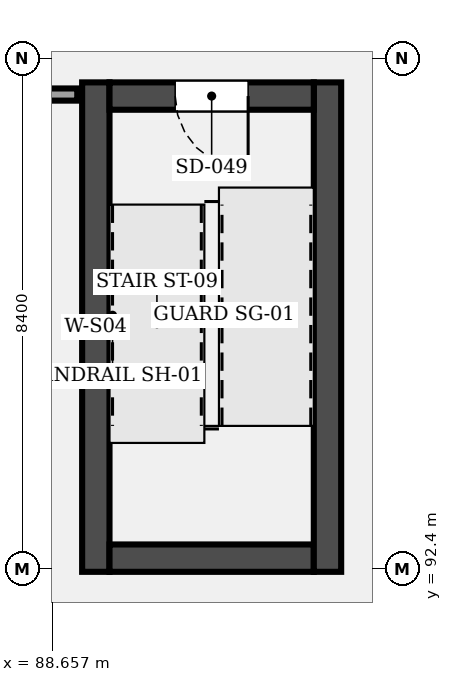
"""IFC4 building model, lengths in metres.
Left out: names, types, materials, properties, quantities, classifications, styles, units other than length and angle.
Written with IfcOpenShell. Run it as: python <this file> out.ifc"""

import sys

from ifc_helpers import new_model, si_unit, direction, frame, frame_2d, origin, place, context, subcontext, project, spatial, rectangle, extrude, element, fill, save


model = new_model("IFC4")
c1 = context("Model", 3, precision=1e-05, world=origin(), true_north=direction((0.0, 1.0)))
c2 = subcontext(c1, "Body", "Model", "MODEL_VIEW")
j1 = project(units=[si_unit("LENGTHUNIT", "METRE"), si_unit("PLANEANGLEUNIT", "RADIAN")], contexts=[c1])
p1 = place(None, origin())
s1 = spatial("IfcSite", under=j1, at=p1, CompositionType="ELEMENT")
p2 = place(p1, origin())
s2 = spatial("IfcBuilding", under=s1, at=p2, CompositionType="ELEMENT")
p3 = place(p2, origin())
s3 = spatial("IfcBuildingStorey", under=s2, at=p3, CompositionType="ELEMENT", Elevation=0.0)
p4 = place(p3, frame((89.375, 100.4, 0.0), z_axis=(0.0, 0.0, 1.0), x_axis=(0.0, -1.0, 0.0)))
e1 = element("IfcWall", 1, at=p4, inside=s3, PredefinedType="SHEAR", context=c2, shape_type="SweptSolid", body=[
    extrude(rectangle(XDim=8.05, YDim=0.45, at=frame_2d((4.025, 0.0))), origin(), (0.0, 0.0, 1.0), 5.1),
])
p5 = place(p3, frame((89.6, 92.575, 0.0), z_axis=(0.0, 0.0, 1.0), x_axis=(1.0, 0.0, 0.0)))
e2 = element("IfcWall", 2, at=p5, inside=s3, PredefinedType="SHEAR", context=c2, shape_type="SweptSolid", body=[
    extrude(rectangle(XDim=3.36, YDim=0.45, at=frame_2d((1.68, 0.0))), origin(), (0.0, 0.0, 1.0), 5.1),
])
p6 = place(p3, frame((93.185, 92.35, 0.0), z_axis=(0.0, 0.0, 1.0), x_axis=(0.0, 1.0, 0.0)))
e3 = element("IfcWall", 3, at=p6, inside=s3, PredefinedType="SHEAR", context=c2, shape_type="SweptSolid", body=[
    extrude(rectangle(XDim=8.05, YDim=0.45, at=frame_2d((4.025, 0.0))), origin(), (0.0, 0.0, 1.0), 5.1),
])
p7 = place(p3, frame((92.96, 100.175, 0.0), z_axis=(0.0, 0.0, 1.0), x_axis=(-1.0, 0.0, 0.0)))
e4 = element("IfcWall", 4, at=p7, inside=s3, PredefinedType="SHEAR", context=c2, shape_type="SweptSolid", body=[
    extrude(rectangle(XDim=3.36, YDim=0.45, at=frame_2d((1.68, 0.0))), origin(), (0.0, 0.0, 1.0), 5.1),
])
p8 = place(p7, frame((1.08, 0.0, 0.0)))
e5 = element("IfcOpeningElement", 5, at=p8, cuts=e4, PredefinedType="OPENING", context=c2, shape_type="SweptSolid", body=[
    extrude(rectangle(XDim=1.2, YDim=2.2, at=frame_2d((0.6, 1.1))), frame((0.0, 0.235, 0.0), z_axis=(0.0, -1.0, 0.0), x_axis=(1.0, 0.0, 0.0)), (0.0, 0.0, 1.0), 0.47),
])
p9 = place(p3, frame((58.0, 100.2, 0.0), z_axis=(0.0, 0.0, 1.0), x_axis=(1.0, 0.0, 0.0)))
e6 = element("IfcWall", 6, at=p9, inside=s3, PredefinedType="PARTITIONING", context=c2, shape_type="SweptSolid", body=[
    extrude(rectangle(XDim=31.07, YDim=0.2, at=frame_2d((15.535, 0.0))), origin(), (0.0, 0.0, 1.0), 3.98),
])
p10 = place(p9, frame((12.65, 0.0, 0.0)))
e7 = element("IfcOpeningElement", 7, at=p10, cuts=e6, PredefinedType="OPENING", context=c2, shape_type="SweptSolid", body=[
    extrude(rectangle(XDim=2.4, YDim=2.4, at=frame_2d((1.2, 1.2))), frame((0.0, 0.11, 0.0), z_axis=(0.0, -1.0, 0.0), x_axis=(1.0, 0.0, 0.0)), (0.0, 0.0, 1.0), 0.22),
])
p11 = place(p8, origin())
e8 = element("IfcDoor", 8, at=p11, inside=s3, OperationType="SINGLE_SWING_LEFT", PredefinedType="DOOR", context=c2, shape_type="SweptSolid", body=[
    extrude(rectangle(XDim=1.2, YDim=2.2, at=frame_2d((0.6, 1.1))), frame((0.0, 0.025, 0.0), z_axis=(0.0, -1.0, 0.0), x_axis=(1.0, 0.0, 0.0)), (0.0, 0.0, 1.0), 0.05),
])
fill(e5, e8)
save(model, sys.argv[1])
